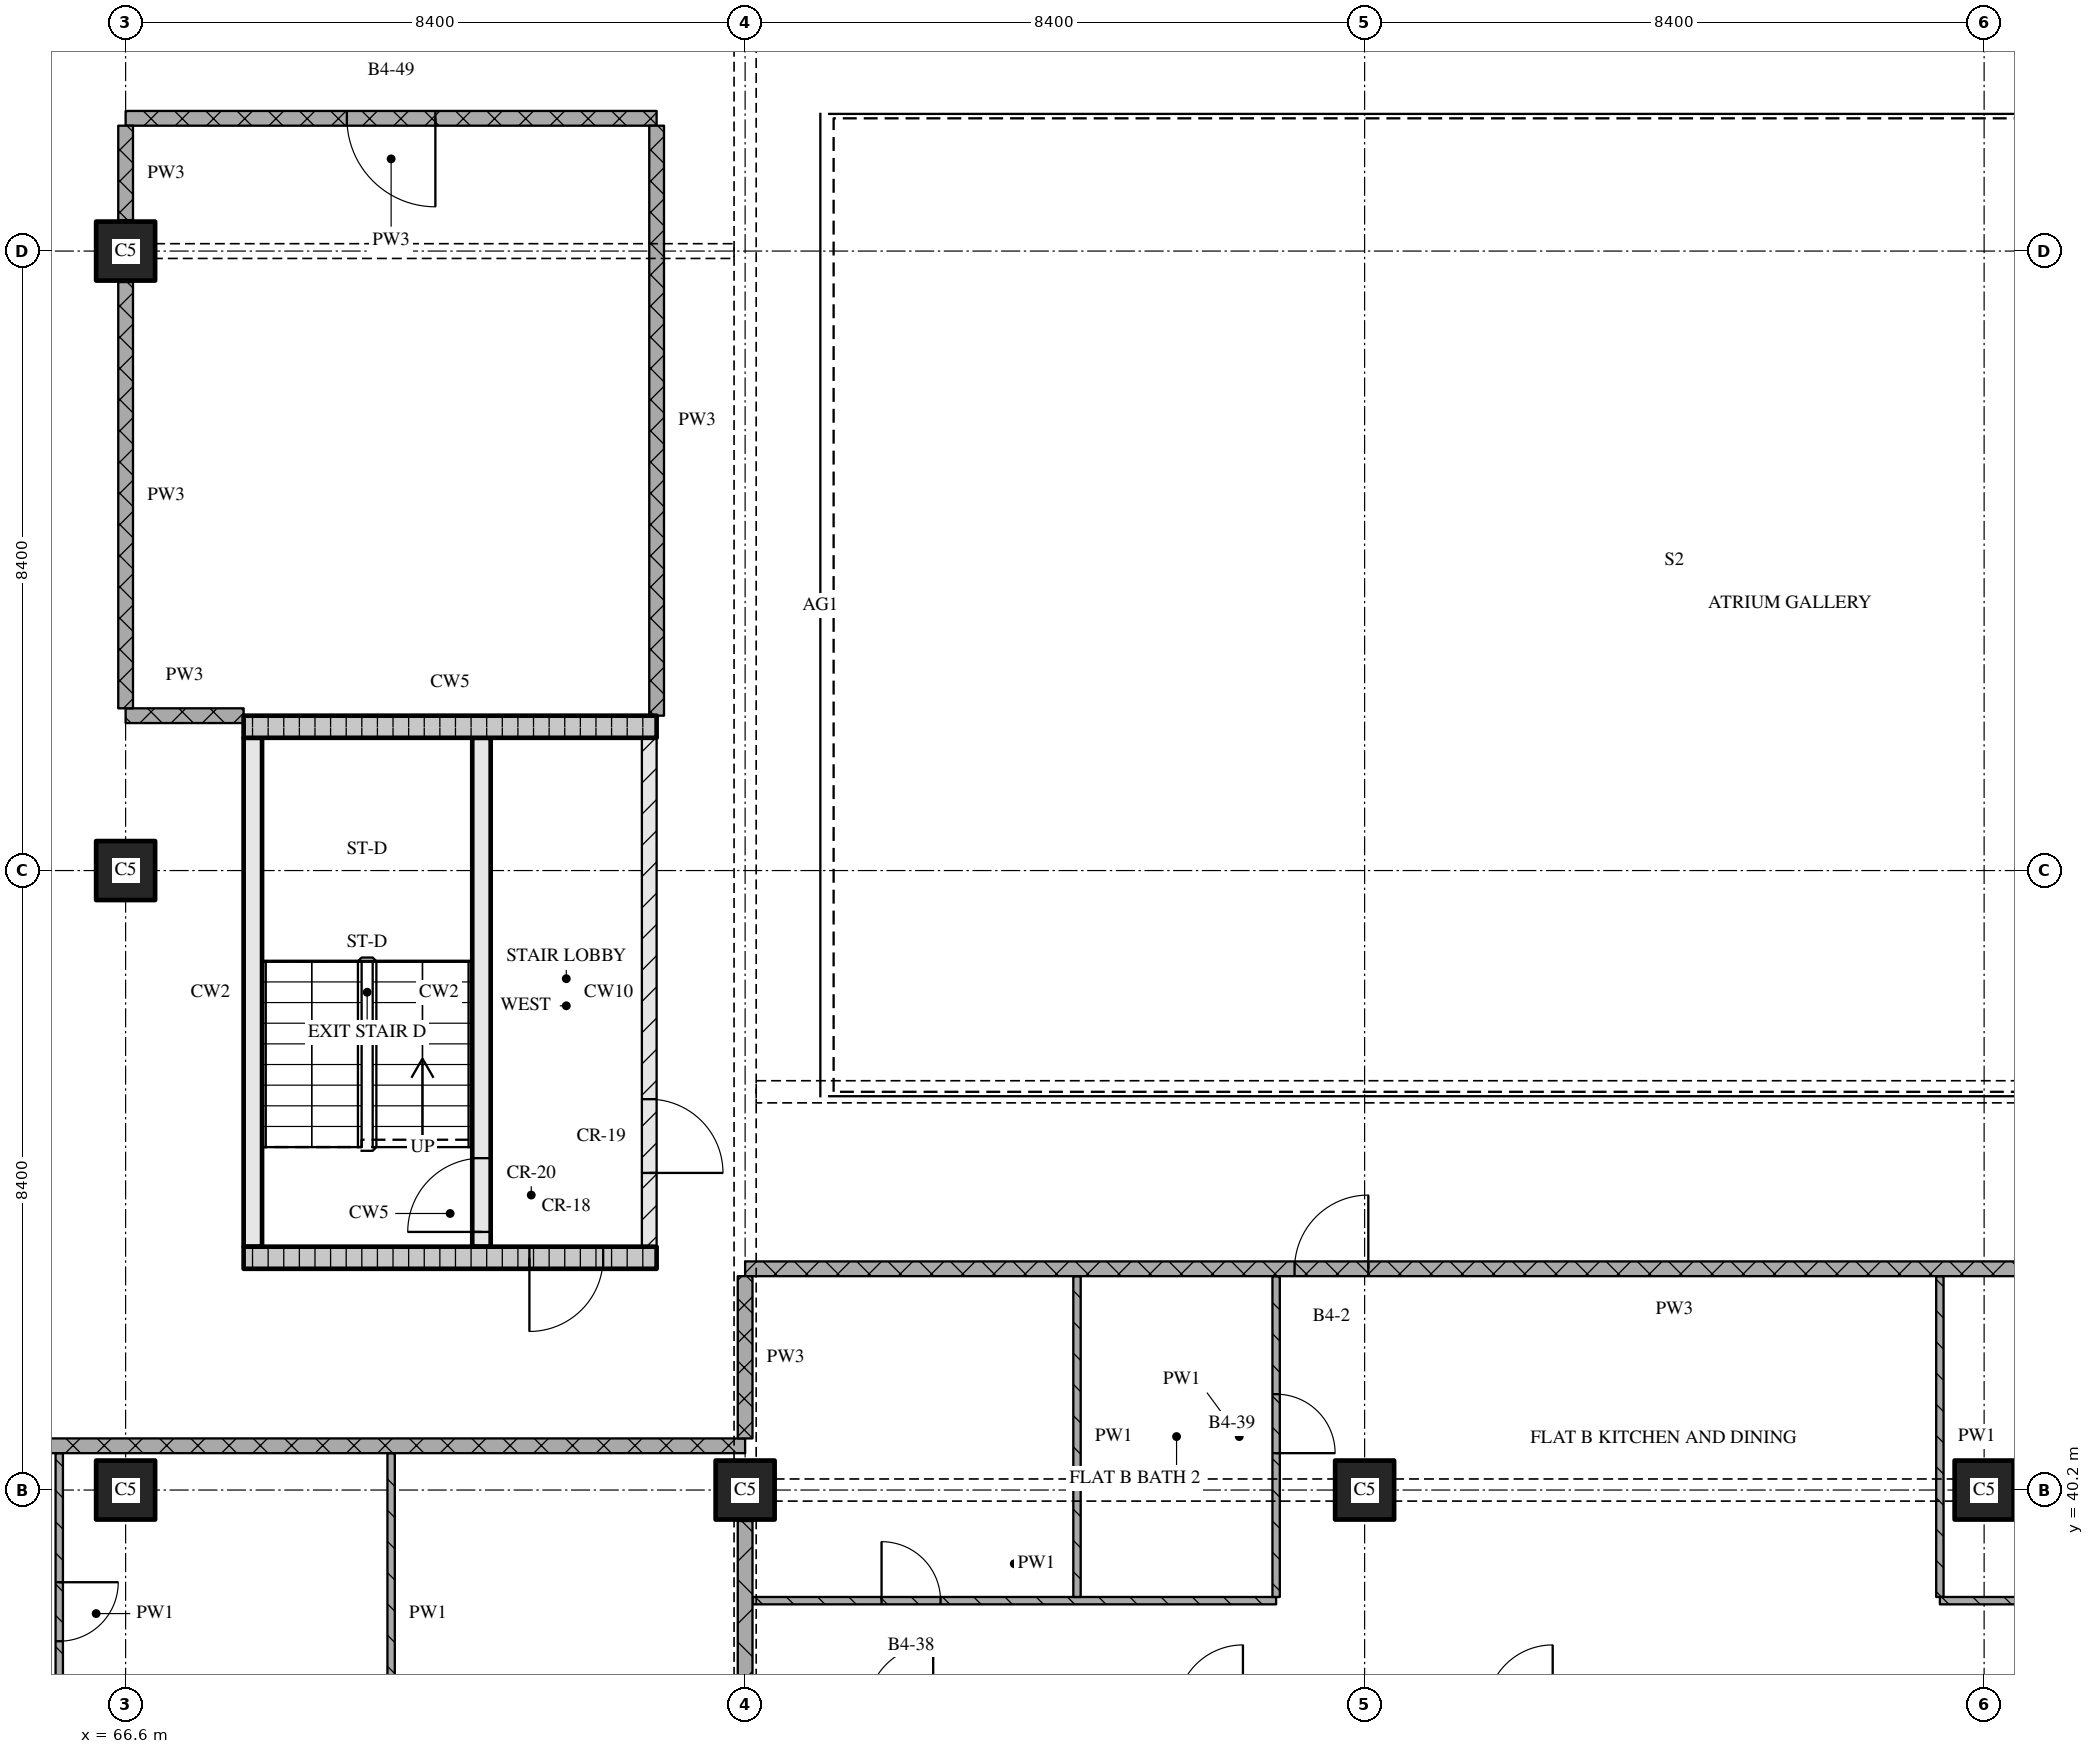
"""IFC4 building model, lengths in metres.
Left out: names, types, materials, properties, quantities, classifications, styles, units other than length and angle.
Written with IfcOpenShell. Run it as: python <this file> out.ifc"""

import sys

from ifc_helpers import new_model, si_unit, direction, frame, frame_2d, origin, origin_2d, place, context, subcontext, project, spatial, rectangle, extrude, element, fill, save


model = new_model("IFC4")
c1 = context("Model", 3, precision=1e-05, world=origin(), true_north=direction((0.0, 1.0)))
c2 = subcontext(c1, "Body", "Model", "MODEL_VIEW")
j1 = project(units=[si_unit("LENGTHUNIT", "METRE"), si_unit("PLANEANGLEUNIT", "RADIAN")], contexts=[c1])
p1 = place(None, origin())
s1 = spatial("IfcSite", under=j1, at=p1, CompositionType="ELEMENT")
p2 = place(p1, origin())
s2 = spatial("IfcBuilding", under=s1, at=p2, CompositionType="ELEMENT")
p3 = place(p2, frame((0.0, 0.0, 127.65)))
s3 = spatial("IfcBuildingStorey", under=s2, at=p3, CompositionType="ELEMENT", Elevation=127.65)
for number, where, z_axis, x_axis in (
    (1, (66.6, 40.2, 0.0), (0.0, 0.0, 1.0), (1.0, 0.0, 0.0)),
    (2, (66.6, 48.6, 0.0), (0.0, 0.0, 1.0), (1.0, 0.0, 0.0)),
    (3, (66.6, 57.0, 0.0), (0.0, 0.0, 1.0), (1.0, 0.0, 0.0)),
    (4, (75.0, 40.2, 0.0), (0.0, 0.0, 1.0), (1.0, 0.0, 0.0)),
    (5, (83.4, 40.2, 0.0), (0.0, 0.0, 1.0), (1.0, 0.0, 0.0)),
    (6, (91.8, 40.2, 0.0), (0.0, 0.0, 1.0), (1.0, 0.0, 0.0)),
):
    element("IfcColumn", number, at=place(p3, frame(where, z_axis=z_axis, x_axis=x_axis)), inside=s3, PredefinedType="COLUMN", context=c2, shape_type="SweptSolid", body=[
        extrude(rectangle(XDim=0.8, YDim=0.8, at=origin_2d()), origin(), (0.0, 0.0, 1.0), 3.6),
    ])
p4 = place(p3, frame((68.2, 43.35, 0.0), z_axis=(0.0, 0.0, 1.0), x_axis=(1.0, 0.0, 0.0)))
e7 = element("IfcWall", 7, at=p4, inside=s3, PredefinedType="SOLIDWALL", context=c2, shape_type="SweptSolid", body=[
    extrude(rectangle(XDim=5.6, YDim=0.3, at=frame_2d((2.8, 0.0))), origin(), (0.0, 0.0, 1.0), 3.32),
])
p5 = place(p4, frame((3.875, 0.0, 0.0)))
e8 = element("IfcOpeningElement", 8, at=p5, cuts=e7, PredefinedType="OPENING", context=c2, shape_type="SweptSolid", body=[
    extrude(rectangle(XDim=1.0, YDim=2.1, at=frame_2d((0.5, 1.05))), frame((0.0, 0.16, 0.0), z_axis=(0.0, -1.0, 0.0), x_axis=(1.0, 0.0, 0.0)), (0.0, 0.0, 1.0), 0.32),
])
p6 = place(p3, frame((68.325, 43.5, 0.0), z_axis=(0.0, 0.0, 1.0), x_axis=(0.0, 1.0, 0.0)))
e9 = element("IfcWall", 9, at=p6, inside=s3, PredefinedType="SOLIDWALL", context=c2, shape_type="SweptSolid", body=[
    extrude(rectangle(XDim=6.9, YDim=0.25, at=frame_2d((3.45, 0.0))), origin(), (0.0, 0.0, 1.0), 3.32),
])
p7 = place(p3, frame((71.425, 43.5, 0.0), z_axis=(0.0, 0.0, 1.0), x_axis=(0.0, 1.0, 0.0)))
e10 = element("IfcWall", 10, at=p7, inside=s3, PredefinedType="SOLIDWALL", context=c2, shape_type="SweptSolid", body=[
    extrude(rectangle(XDim=6.9, YDim=0.25, at=frame_2d((3.45, 0.0))), origin(), (0.0, 0.0, 1.0), 3.32),
])
p8 = place(p7, frame((0.2, 0.0, 0.0)))
e11 = element("IfcOpeningElement", 11, at=p8, cuts=e10, PredefinedType="OPENING", context=c2, shape_type="SweptSolid", body=[
    extrude(rectangle(XDim=1.0, YDim=2.1, at=frame_2d((0.5, 1.05))), frame((0.0, 0.135, 0.0), z_axis=(0.0, -1.0, 0.0), x_axis=(1.0, 0.0, 0.0)), (0.0, 0.0, 1.0), 0.27),
])
p9 = place(p3, frame((73.7, 43.5, 0.0), z_axis=(0.0, 0.0, 1.0), x_axis=(0.0, 1.0, 0.0)))
e12 = element("IfcWall", 12, at=p9, inside=s3, PredefinedType="PARTITIONING", context=c2, shape_type="SweptSolid", body=[
    extrude(rectangle(XDim=6.9, YDim=0.2, at=frame_2d((3.45, 0.0))), origin(), (0.0, 0.0, 1.0), 3.32),
])
p10 = place(p9, frame((1.0, 0.0, 0.0)))
e13 = element("IfcOpeningElement", 13, at=p10, cuts=e12, PredefinedType="OPENING", context=c2, shape_type="SweptSolid", body=[
    extrude(rectangle(XDim=1.0, YDim=2.1, at=frame_2d((0.5, 1.05))), frame((0.0, 0.11, 0.0), z_axis=(0.0, -1.0, 0.0), x_axis=(1.0, 0.0, 0.0)), (0.0, 0.0, 1.0), 0.22),
])
p11 = place(p3, frame((68.2, 50.55, 0.0), z_axis=(0.0, 0.0, 1.0), x_axis=(1.0, 0.0, 0.0)))
e14 = element("IfcWall", 14, at=p11, inside=s3, PredefinedType="SOLIDWALL", context=c2, shape_type="SweptSolid", body=[
    extrude(rectangle(XDim=5.6, YDim=0.3, at=frame_2d((2.8, 0.0))), origin(), (0.0, 0.0, 1.0), 3.32),
])
p12 = place(p3, frame((75.1, 38.7, 0.0), z_axis=(0.0, 0.0, 1.0), x_axis=(1.0, 0.0, 0.0)))
e15 = element("IfcWall", 15, at=p12, inside=s3, PredefinedType="PARTITIONING", context=c2, shape_type="SweptSolid", body=[
    extrude(rectangle(XDim=7.1, YDim=0.1, at=frame_2d((3.55, 0.0))), origin(), (0.0, 0.0, 1.0), 3.32),
])
p13 = place(p12, frame((1.75, 0.0, 0.0)))
e16 = element("IfcOpeningElement", 16, at=p13, cuts=e15, PredefinedType="OPENING", context=c2, shape_type="SweptSolid", body=[
    extrude(rectangle(XDim=0.8, YDim=2.1, at=frame_2d((0.4, 1.05))), frame((0.0, 0.06, 0.0), z_axis=(0.0, -1.0, 0.0), x_axis=(1.0, 0.0, 0.0)), (0.0, 0.0, 1.0), 0.12),
])
p14 = place(p3, frame((91.2, 38.7, 0.0), z_axis=(0.0, 0.0, 1.0), x_axis=(1.0, 0.0, 0.0)))
e17 = element("IfcWall", 17, at=p14, inside=s3, PredefinedType="PARTITIONING", context=c2, shape_type="SweptSolid", body=[
    extrude(rectangle(XDim=8.9, YDim=0.1, at=frame_2d((4.45, 0.0))), origin(), (0.0, 0.0, 1.0), 3.32),
])
p15 = place(p14, frame((4.05, 0.0, 0.0)))
e18 = element("IfcOpeningElement", 18, at=p15, cuts=e17, PredefinedType="OPENING", context=c2, shape_type="SweptSolid", body=[
    extrude(rectangle(XDim=0.9, YDim=2.1, at=frame_2d((0.45, 1.05))), frame((0.0, 0.06, 0.0), z_axis=(0.0, -1.0, 0.0), x_axis=(1.0, 0.0, 0.0)), (0.0, 0.0, 1.0), 0.12),
])
p16 = place(p3, frame((75.0, 40.8, 0.0), z_axis=(0.0, 0.0, 1.0), x_axis=(-1.0, 0.0, 0.0)))
e19 = element("IfcWall", 19, at=p16, inside=s3, PredefinedType="PARTITIONING", context=c2, shape_type="SweptSolid", body=[
    extrude(rectangle(XDim=24.18, YDim=0.2, at=frame_2d((12.09, 0.0))), origin(), (0.0, 0.0, 1.0), 3.32),
])
p17 = place(p16, frame((9.55, 0.0, 0.0)))
e20 = element("IfcOpeningElement", 20, at=p17, cuts=e19, PredefinedType="OPENING", context=c2, shape_type="SweptSolid", body=[
    extrude(rectangle(XDim=1.0, YDim=2.1, at=frame_2d((0.5, 1.05))), frame((0.0, 0.11, 0.0), z_axis=(0.0, -1.0, 0.0), x_axis=(1.0, 0.0, 0.0)), (0.0, 0.0, 1.0), 0.22),
])
p18 = place(p3, frame((100.2, 43.2, 0.0), z_axis=(0.0, 0.0, 1.0), x_axis=(-1.0, 0.0, 0.0)))
e21 = element("IfcWall", 21, at=p18, inside=s3, PredefinedType="PARTITIONING", context=c2, shape_type="SweptSolid", body=[
    extrude(rectangle(XDim=25.2, YDim=0.2, at=frame_2d((12.6, 0.0))), origin(), (0.0, 0.0, 1.0), 3.32),
])
p19 = place(p18, frame((16.75, 0.0, 0.0)))
e22 = element("IfcOpeningElement", 22, at=p19, cuts=e21, PredefinedType="OPENING", context=c2, shape_type="SweptSolid", body=[
    extrude(rectangle(XDim=1.0, YDim=2.1, at=frame_2d((0.5, 1.05))), frame((0.0, 0.11, 0.0), z_axis=(0.0, -1.0, 0.0), x_axis=(1.0, 0.0, 0.0)), (0.0, 0.0, 1.0), 0.22),
])
p20 = place(p3, frame((66.6, 50.7, 0.0), z_axis=(0.0, 0.0, 1.0), x_axis=(1.0, 0.0, 0.0)))
e23 = element("IfcWall", 23, at=p20, inside=s3, PredefinedType="PARTITIONING", context=c2, shape_type="SweptSolid", body=[
    extrude(rectangle(XDim=1.6, YDim=0.2, at=frame_2d((0.8, 0.0))), origin(), (0.0, 0.0, 1.0), 3.32),
])
p21 = place(p3, frame((73.8, 58.8, 0.0), z_axis=(0.0, 0.0, 1.0), x_axis=(-1.0, 0.0, 0.0)))
e24 = element("IfcWall", 24, at=p21, inside=s3, PredefinedType="PARTITIONING", context=c2, shape_type="SweptSolid", body=[
    extrude(rectangle(XDim=7.2, YDim=0.2, at=frame_2d((3.6, 0.0))), origin(), (0.0, 0.0, 1.0), 3.32),
])
p22 = place(p21, frame((3.0, 0.0, 0.0)))
e25 = element("IfcOpeningElement", 25, at=p22, cuts=e24, PredefinedType="OPENING", context=c2, shape_type="SweptSolid", body=[
    extrude(rectangle(XDim=1.2, YDim=2.1, at=frame_2d((0.6, 1.05))), frame((0.0, 0.11, 0.0), z_axis=(0.0, -1.0, 0.0), x_axis=(1.0, 0.0, 0.0)), (0.0, 0.0, 1.0), 0.22),
])
p23 = place(p3, frame((65.7, 40.7, 0.0), z_axis=(0.0, 0.0, 1.0), x_axis=(0.0, -1.0, 0.0)))
e26 = element("IfcWall", 26, at=p23, inside=s3, PredefinedType="PARTITIONING", context=c2, shape_type="SweptSolid", body=[
    extrude(rectangle(XDim=4.35, YDim=0.1, at=frame_2d((2.175, 0.0))), origin(), (0.0, 0.0, 1.0), 3.32),
])
p24 = place(p23, frame((1.75, 0.0, 0.0)))
e27 = element("IfcOpeningElement", 27, at=p24, cuts=e26, PredefinedType="OPENING", context=c2, shape_type="SweptSolid", body=[
    extrude(rectangle(XDim=0.8, YDim=2.1, at=frame_2d((0.4, 1.05))), frame((0.0, 0.06, 0.0), z_axis=(0.0, -1.0, 0.0), x_axis=(1.0, 0.0, 0.0)), (0.0, 0.0, 1.0), 0.12),
])
p25 = place(p3, frame((66.6, 56.58, 0.0), z_axis=(0.0, 0.0, 1.0), x_axis=(0.0, -1.0, 0.0)))
e28 = element("IfcWall", 28, at=p25, inside=s3, PredefinedType="PARTITIONING", context=c2, shape_type="SweptSolid", body=[
    extrude(rectangle(XDim=5.78, YDim=0.2, at=frame_2d((2.89, 0.0))), origin(), (0.0, 0.0, 1.0), 3.32),
])
p26 = place(p3, frame((66.6, 58.7, 0.0), z_axis=(0.0, 0.0, 1.0), x_axis=(0.0, -1.0, 0.0)))
e29 = element("IfcWall", 29, at=p26, inside=s3, PredefinedType="PARTITIONING", context=c2, shape_type="SweptSolid", body=[
    extrude(rectangle(XDim=1.28, YDim=0.2, at=frame_2d((0.64, 0.0))), origin(), (0.0, 0.0, 1.0), 3.32),
])
p27 = place(p3, frame((70.2, 40.7, 0.0), z_axis=(0.0, 0.0, 1.0), x_axis=(0.0, -1.0, 0.0)))
e30 = element("IfcWall", 30, at=p27, inside=s3, PredefinedType="PARTITIONING", context=c2, shape_type="SweptSolid", body=[
    extrude(rectangle(XDim=4.35, YDim=0.1, at=frame_2d((2.175, 0.0))), origin(), (0.0, 0.0, 1.0), 3.32),
])
p28 = place(p3, frame((73.8, 58.7, 0.0), z_axis=(0.0, 0.0, 1.0), x_axis=(0.0, -1.0, 0.0)))
e31 = element("IfcWall", 31, at=p28, inside=s3, PredefinedType="PARTITIONING", context=c2, shape_type="SweptSolid", body=[
    extrude(rectangle(XDim=8.0, YDim=0.2, at=frame_2d((4.0, 0.0))), origin(), (0.0, 0.0, 1.0), 3.32),
])
p29 = place(p3, frame((75.0, 43.1, 0.0), z_axis=(0.0, 0.0, 1.0), x_axis=(0.0, -1.0, 0.0)))
e32 = element("IfcWall", 32, at=p29, inside=s3, PredefinedType="PARTITIONING", context=c2, shape_type="SweptSolid", body=[
    extrude(rectangle(XDim=2.2, YDim=0.2, at=frame_2d((1.1, 0.0))), origin(), (0.0, 0.0, 1.0), 2.43),
])
p30 = place(p3, frame((75.0, 39.78, 0.0), z_axis=(0.0, 0.0, 1.0), x_axis=(0.0, -1.0, 0.0)))
e33 = element("IfcWall", 33, at=p30, inside=s3, PredefinedType="PARTITIONING", context=c2, shape_type="SweptSolid", body=[
    extrude(rectangle(XDim=7.56, YDim=0.2, at=frame_2d((3.78, 0.0))), origin(), (0.0, 0.0, 1.0), 2.83),
])
p31 = place(p3, frame((79.5, 43.1, 0.0), z_axis=(0.0, 0.0, 1.0), x_axis=(0.0, -1.0, 0.0)))
e34 = element("IfcWall", 34, at=p31, inside=s3, PredefinedType="PARTITIONING", context=c2, shape_type="SweptSolid", body=[
    extrude(rectangle(XDim=4.35, YDim=0.1, at=frame_2d((2.175, 0.0))), origin(), (0.0, 0.0, 1.0), 3.32),
])
p32 = place(p3, frame((82.2, 38.75, 0.0), z_axis=(0.0, 0.0, 1.0), x_axis=(0.0, 1.0, 0.0)))
e35 = element("IfcWall", 35, at=p32, inside=s3, PredefinedType="PARTITIONING", context=c2, shape_type="SweptSolid", body=[
    extrude(rectangle(XDim=4.35, YDim=0.1, at=frame_2d((2.175, 0.0))), origin(), (0.0, 0.0, 1.0), 3.32),
])
p33 = place(p32, frame((1.95, 0.0, 0.0)))
e36 = element("IfcOpeningElement", 36, at=p33, cuts=e35, PredefinedType="OPENING", context=c2, shape_type="SweptSolid", body=[
    extrude(rectangle(XDim=0.8, YDim=2.1, at=frame_2d((0.4, 1.05))), frame((0.0, 0.06, 0.0), z_axis=(0.0, -1.0, 0.0), x_axis=(1.0, 0.0, 0.0)), (0.0, 0.0, 1.0), 0.12),
])
p34 = place(p3, frame((91.2, 43.1, 0.0), z_axis=(0.0, 0.0, 1.0), x_axis=(0.0, -1.0, 0.0)))
e37 = element("IfcWall", 37, at=p34, inside=s3, PredefinedType="PARTITIONING", context=c2, shape_type="SweptSolid", body=[
    extrude(rectangle(XDim=4.35, YDim=0.1, at=frame_2d((2.175, 0.0))), origin(), (0.0, 0.0, 1.0), 3.32),
])
p35 = place(p5, origin())
e38 = element("IfcDoor", 38, at=p35, inside=s3, OperationType="SINGLE_SWING_RIGHT", PredefinedType="DOOR", context=c2, shape_type="SweptSolid", body=[
    extrude(rectangle(XDim=1.0, YDim=2.1, at=frame_2d((0.5, 1.05))), frame((0.0, 0.025, 0.0), z_axis=(0.0, -1.0, 0.0), x_axis=(1.0, 0.0, 0.0)), (0.0, 0.0, 1.0), 0.05),
])
fill(e8, e38)
p36 = place(p8, origin())
e39 = element("IfcDoor", 39, at=p36, inside=s3, OperationType="SINGLE_SWING_LEFT", PredefinedType="DOOR", context=c2, shape_type="SweptSolid", body=[
    extrude(rectangle(XDim=1.0, YDim=2.1, at=frame_2d((0.5, 1.05))), frame((0.0, 0.025, 0.0), z_axis=(0.0, -1.0, 0.0), x_axis=(1.0, 0.0, 0.0)), (0.0, 0.0, 1.0), 0.05),
])
fill(e11, e39)
p37 = place(p10, origin())
e40 = element("IfcDoor", 40, at=p37, inside=s3, OperationType="SINGLE_SWING_RIGHT", PredefinedType="DOOR", context=c2, shape_type="SweptSolid", body=[
    extrude(rectangle(XDim=1.0, YDim=2.1, at=frame_2d((0.5, 1.05))), frame((0.0, 0.025, 0.0), z_axis=(0.0, -1.0, 0.0), x_axis=(1.0, 0.0, 0.0)), (0.0, 0.0, 1.0), 0.05),
])
fill(e13, e40)
p38 = place(p13, origin())
e41 = element("IfcDoor", 41, at=p38, inside=s3, OperationType="SINGLE_SWING_LEFT", PredefinedType="DOOR", context=c2, shape_type="SweptSolid", body=[
    extrude(rectangle(XDim=0.8, YDim=2.1, at=frame_2d((0.4, 1.05))), frame((0.0, 0.025, 0.0), z_axis=(0.0, -1.0, 0.0), x_axis=(1.0, 0.0, 0.0)), (0.0, 0.0, 1.0), 0.05),
])
fill(e16, e41)
p39 = place(p19, origin())
e42 = element("IfcDoor", 42, at=p39, inside=s3, OperationType="SINGLE_SWING_RIGHT", PredefinedType="DOOR", context=c2, shape_type="SweptSolid", body=[
    extrude(rectangle(XDim=1.0, YDim=2.1, at=frame_2d((0.5, 1.05))), frame((0.0, 0.025, 0.0), z_axis=(0.0, -1.0, 0.0), x_axis=(1.0, 0.0, 0.0)), (0.0, 0.0, 1.0), 0.05),
])
fill(e22, e42)
p40 = place(p22, origin())
e43 = element("IfcDoor", 43, at=p40, inside=s3, OperationType="SINGLE_SWING_LEFT", PredefinedType="DOOR", context=c2, shape_type="SweptSolid", body=[
    extrude(rectangle(XDim=1.2, YDim=2.1, at=frame_2d((0.6, 1.05))), frame((0.0, 0.025, 0.0), z_axis=(0.0, -1.0, 0.0), x_axis=(1.0, 0.0, 0.0)), (0.0, 0.0, 1.0), 0.05),
])
fill(e25, e43)
p41 = place(p24, origin())
e44 = element("IfcDoor", 44, at=p41, inside=s3, OperationType="SINGLE_SWING_LEFT", PredefinedType="DOOR", context=c2, shape_type="SweptSolid", body=[
    extrude(rectangle(XDim=0.8, YDim=2.1, at=frame_2d((0.4, 1.05))), frame((0.0, 0.025, 0.0), z_axis=(0.0, -1.0, 0.0), x_axis=(1.0, 0.0, 0.0)), (0.0, 0.0, 1.0), 0.05),
])
fill(e27, e44)
p42 = place(p33, origin())
e45 = element("IfcDoor", 45, at=p42, inside=s3, OperationType="SINGLE_SWING_RIGHT", PredefinedType="DOOR", context=c2, shape_type="SweptSolid", body=[
    extrude(rectangle(XDim=0.8, YDim=2.1, at=frame_2d((0.4, 1.05))), frame((0.0, 0.025, 0.0), z_axis=(0.0, -1.0, 0.0), x_axis=(1.0, 0.0, 0.0)), (0.0, 0.0, 1.0), 0.05),
])
fill(e36, e45)
save(model, sys.argv[1])
